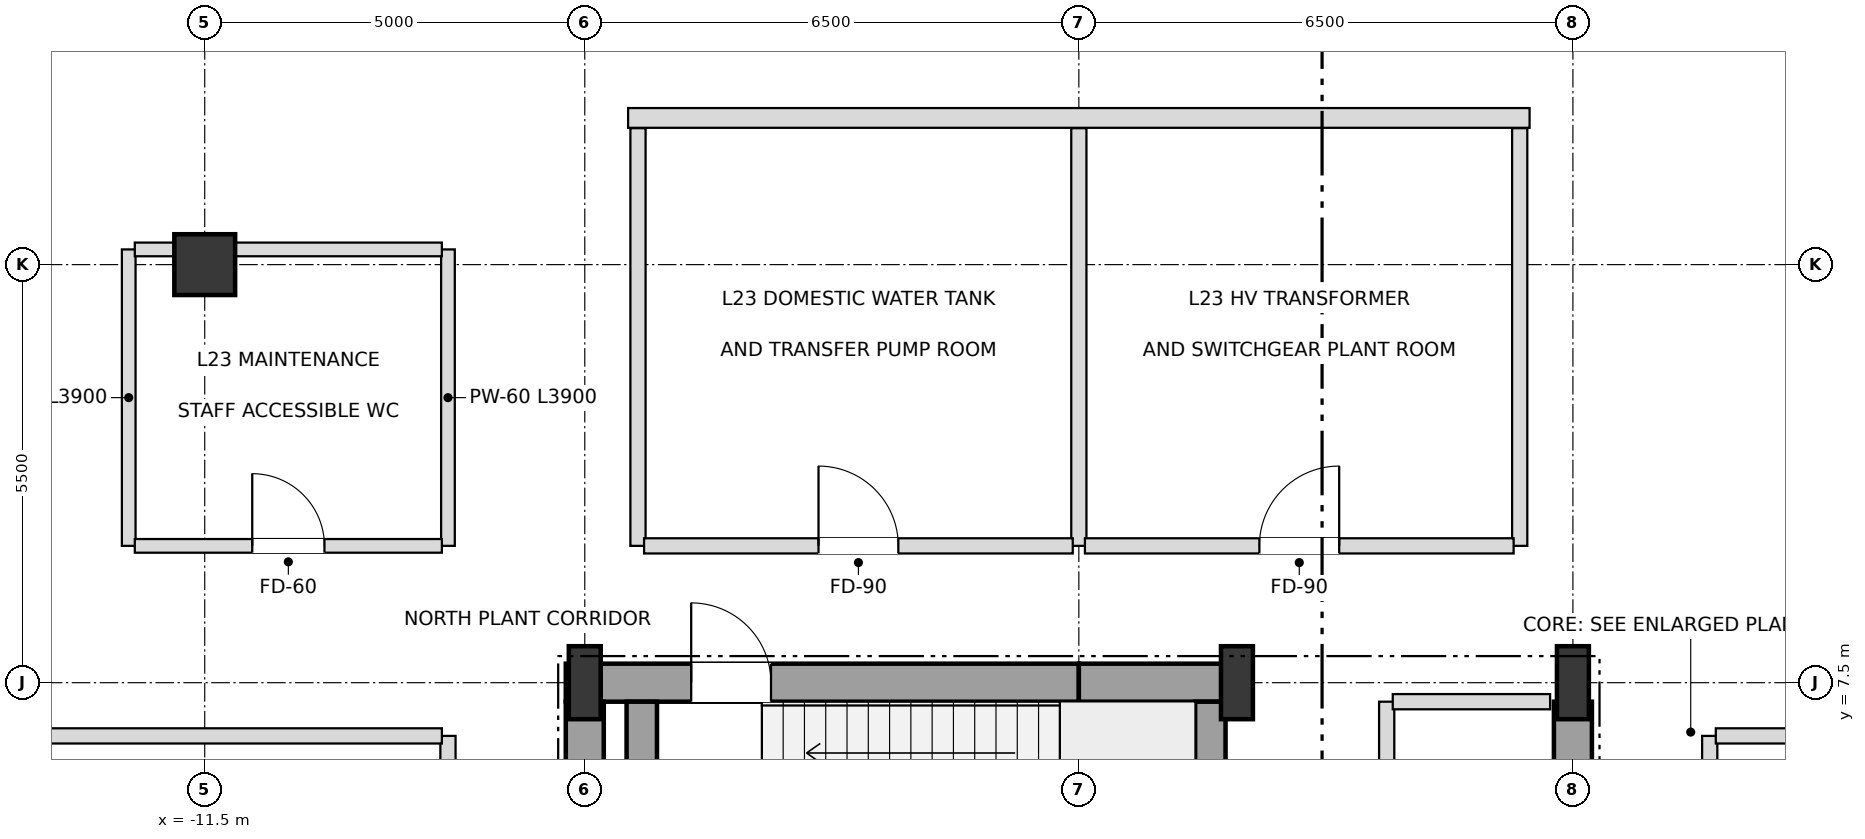
"""IFC4 building model, lengths in metres.
Left out: names, types, materials, properties, quantities, classifications, styles, units other than length and angle.
Written with IfcOpenShell. Run it as: python <this file> out.ifc"""

import sys

from ifc_helpers import new_model, si_unit, direction, frame, frame_2d, origin, origin_2d, place, context, subcontext, project, spatial, rectangle, i_section, extrude, element, fill, save


model = new_model("IFC4")
c1 = context("Model", 3, precision=1e-05, world=origin(), true_north=direction((0.0, 1.0)))
c2 = subcontext(c1, "Body", "Model", "MODEL_VIEW")
j1 = project(units=[si_unit("LENGTHUNIT", "METRE"), si_unit("PLANEANGLEUNIT", "RADIAN")], contexts=[c1])
p1 = place(None, origin())
s1 = spatial("IfcSite", under=j1, at=p1, CompositionType="ELEMENT")
p2 = place(p1, origin())
s2 = spatial("IfcBuilding", under=s1, at=p2, CompositionType="ELEMENT")
p3 = place(p2, frame((0.0, 0.0, 93.6)))
s3 = spatial("IfcBuildingStorey", under=s2, at=p3, CompositionType="ELEMENT", Elevation=93.6)
for number, where, z_axis, x_axis in (
    (1, (-6.5, 7.5, 0.0), (0.0, 0.0, 1.0), (1.0, 0.0, 0.0)),
    (2, (2.08, 7.5, 0.0), (0.0, 0.0, 1.0), (1.0, 0.0, 0.0)),
    (3, (6.5, 7.5, 0.0), (0.0, 0.0, 1.0), (1.0, 0.0, 0.0)),
):
    element("IfcColumn", number, at=place(p3, frame(where, z_axis=z_axis, x_axis=x_axis)), inside=s3, PredefinedType="COLUMN", context=c2, shape_type="SweptSolid", body=[
        extrude(i_section(OverallWidth=0.42, OverallDepth=0.96, WebThickness=0.022, FlangeThickness=0.034, at=origin_2d()), origin(), (0.0, 0.0, 1.0), 5.4),
    ])
p4 = place(p3, frame((-11.5, 13.0, 0.0), z_axis=(0.0, 0.0, 1.0), x_axis=(1.0, 0.0, 0.0)))
e4 = element("IfcColumn", 4, at=p4, inside=s3, PredefinedType="COLUMN", context=c2, shape_type="SweptSolid", body=[
    extrude(rectangle(XDim=0.8, YDim=0.8, at=origin_2d()), origin(), (0.0, 0.0, 1.0), 5.4),
])
p5 = place(p3, frame((-5.93, 14.93, 0.0), z_axis=(0.0, 0.0, 1.0), x_axis=(1.0, 0.0, 0.0)))
e5 = element("IfcWall", 5, at=p5, inside=s3, PredefinedType="SOLIDWALL", context=c2, shape_type="SweptSolid", body=[
    extrude(rectangle(XDim=11.86, YDim=0.26, at=frame_2d((5.93, 0.0))), origin(), (0.0, 0.0, 1.0), 5.1),
])
p6 = place(p3, frame((-6.75, 7.5, 0.0), z_axis=(0.0, 0.0, 1.0), x_axis=(1.0, 0.0, 0.0)))
e6 = element("IfcWall", 6, at=p6, inside=s3, PredefinedType="SHEAR", context=c2, shape_type="SweptSolid", body=[
    extrude(rectangle(XDim=6.75, YDim=0.5, at=frame_2d((3.375, 0.0))), origin(), (0.0, 0.0, 1.0), 5.1),
])
p7 = place(p6, frame((1.65, 0.0, 0.0)))
e7 = element("IfcOpeningElement", 7, at=p7, cuts=e6, PredefinedType="OPENING", context=c2, shape_type="SweptSolid", body=[
    extrude(rectangle(XDim=1.05, YDim=2.15, at=frame_2d((0.525, 1.075))), frame((0.0, 0.26, 0.0), z_axis=(0.0, -1.0, 0.0), x_axis=(1.0, 0.0, 0.0)), (0.0, 0.0, 1.0), 0.52),
])
p8 = place(p3, frame((0.0, 7.5, 0.0), z_axis=(0.0, 0.0, 1.0), x_axis=(1.0, 0.0, 0.0)))
e8 = element("IfcWall", 8, at=p8, inside=s3, PredefinedType="SHEAR", context=c2, shape_type="SweptSolid", body=[
    extrude(rectangle(XDim=2.08, YDim=0.5, at=frame_2d((1.04, 0.0))), origin(), (0.0, 0.0, 1.0), 5.1),
])
for number, where, z_axis, x_axis in (
    (9, (-6.5, 3.95, 0.0), (0.0, 0.0, 1.0), (0.0, 1.0, 0.0)),
    (10, (6.5, 3.95, 0.0), (0.0, 0.0, 1.0), (0.0, 1.0, 0.0)),
):
    element("IfcWall", number, at=place(p3, frame(where, z_axis=z_axis, x_axis=x_axis)), inside=s3, PredefinedType="SHEAR", context=c2, shape_type="SweptSolid", body=[
        extrude(rectangle(XDim=3.3, YDim=0.5, at=frame_2d((1.65, 0.0))), origin(), (0.0, 0.0, 1.0), 5.1),
    ])
for number, where, z_axis, x_axis in (
    (11, (1.73, 3.95, 0.0), (0.0, 0.0, 1.0), (0.0, 1.0, 0.0)),
    (12, (-5.75, 3.95, 0.0), (0.0, 0.0, 1.0), (0.0, 1.0, 0.0)),
):
    element("IfcWall", number, at=place(p3, frame(where, z_axis=z_axis, x_axis=x_axis)), inside=s3, PredefinedType="SHEAR", context=c2, shape_type="SweptSolid", body=[
        extrude(rectangle(XDim=3.3, YDim=0.4, at=frame_2d((1.65, 0.0))), origin(), (0.0, 0.0, 1.0), 5.1),
    ])
p9 = place(p3, frame((-12.5, 9.3, 0.0), z_axis=(0.0, 0.0, 1.0), x_axis=(0.0, 1.0, 0.0)))
e13 = element("IfcWall", 13, at=p9, inside=s3, PredefinedType="PARTITIONING", context=c2, shape_type="SweptSolid", body=[
    extrude(rectangle(XDim=3.9, YDim=0.18, at=frame_2d((1.95, 0.0))), origin(), (0.0, 0.0, 1.0), 3.285),
])
p10 = place(p3, frame((-8.3, -6.8, 0.0), z_axis=(0.0, 0.0, 1.0), x_axis=(0.0, 1.0, 0.0)))
e14 = element("IfcWall", 14, at=p10, inside=s3, PredefinedType="SOLIDWALL", context=c2, shape_type="SweptSolid", body=[
    extrude(rectangle(XDim=13.6, YDim=0.2, at=frame_2d((6.8, 0.0))), origin(), (0.0, 0.0, 1.0), 5.1),
])
p11 = place(p10, frame((6.275, 0.0, 0.0)))
e15 = element("IfcOpeningElement", 15, at=p11, cuts=e14, PredefinedType="OPENING", context=c2, shape_type="SweptSolid", body=[
    extrude(rectangle(XDim=1.05, YDim=2.15, at=frame_2d((0.525, 1.075))), frame((0.0, 0.11, 0.0), z_axis=(0.0, -1.0, 0.0), x_axis=(1.0, 0.0, 0.0)), (0.0, 0.0, 1.0), 0.22),
])
p12 = place(p3, frame((-8.3, 9.3, 0.0), z_axis=(0.0, 0.0, 1.0), x_axis=(0.0, 1.0, 0.0)))
e16 = element("IfcWall", 16, at=p12, inside=s3, PredefinedType="PARTITIONING", context=c2, shape_type="SweptSolid", body=[
    extrude(rectangle(XDim=3.9, YDim=0.18, at=frame_2d((1.95, 0.0))), origin(), (0.0, 0.0, 1.0), 4.153),
])
for number, where, z_axis, x_axis in (
    (17, (-5.8, 9.3, 0.0), (0.0, 0.0, 1.0), (0.0, 1.0, 0.0)),
    (18, (0.0, 9.3, 0.0), (0.0, 0.0, 1.0), (0.0, 1.0, 0.0)),
):
    element("IfcWall", number, at=place(p3, frame(where, z_axis=z_axis, x_axis=x_axis)), inside=s3, PredefinedType="SOLIDWALL", context=c2, shape_type="SweptSolid", body=[
        extrude(rectangle(XDim=5.495, YDim=0.2, at=frame_2d((2.748, 0.0))), origin(), (0.0, 0.0, 1.0), 5.1),
    ])
p13 = place(p3, frame((4.05, 4.2, 0.0), z_axis=(0.0, 0.0, 1.0), x_axis=(0.0, 1.0, 0.0)))
e19 = element("IfcWall", 19, at=p13, inside=s3, PredefinedType="SOLIDWALL", context=c2, shape_type="SweptSolid", body=[
    extrude(rectangle(XDim=3.05, YDim=0.2, at=frame_2d((1.525, 0.0))), origin(), (0.0, 0.0, 1.0), 5.1),
])
p14 = place(p13, frame((0.975, 0.0, 0.0)))
e20 = element("IfcOpeningElement", 20, at=p14, cuts=e19, PredefinedType="OPENING", context=c2, shape_type="SweptSolid", body=[
    extrude(rectangle(XDim=0.95, YDim=2.15, at=frame_2d((0.475, 1.075))), frame((0.0, 0.11, 0.0), z_axis=(0.0, -1.0, 0.0), x_axis=(1.0, 0.0, 0.0)), (0.0, 0.0, 1.0), 0.22),
])
p15 = place(p3, frame((5.8, 9.3, 0.0), z_axis=(0.0, 0.0, 1.0), x_axis=(0.0, 1.0, 0.0)))
e21 = element("IfcWall", 21, at=p15, inside=s3, PredefinedType="SOLIDWALL", context=c2, shape_type="SweptSolid", body=[
    extrude(rectangle(XDim=5.495, YDim=0.2, at=frame_2d((2.748, 0.0))), origin(), (0.0, 0.0, 1.0), 5.1),
])
p16 = place(p3, frame((8.3, -6.8, 0.0), z_axis=(0.0, 0.0, 1.0), x_axis=(0.0, 1.0, 0.0)))
e22 = element("IfcWall", 22, at=p16, inside=s3, PredefinedType="SOLIDWALL", context=c2, shape_type="SweptSolid", body=[
    extrude(rectangle(XDim=13.6, YDim=0.2, at=frame_2d((6.8, 0.0))), origin(), (0.0, 0.0, 1.0), 5.1),
])
p17 = place(p16, frame((6.275, 0.0, 0.0)))
e23 = element("IfcOpeningElement", 23, at=p17, cuts=e22, PredefinedType="OPENING", context=c2, shape_type="SweptSolid", body=[
    extrude(rectangle(XDim=1.05, YDim=2.15, at=frame_2d((0.525, 1.075))), frame((0.0, 0.11, 0.0), z_axis=(0.0, -1.0, 0.0), x_axis=(1.0, 0.0, 0.0)), (0.0, 0.0, 1.0), 0.22),
])
for number, where, z_axis, x_axis in (
    (24, (-16.195, 6.8, 0.0), (0.0, 0.0, 1.0), (1.0, 0.0, 0.0)),
    (25, (8.38, 6.8, 0.0), (0.0, 0.0, 1.0), (1.0, 0.0, 0.0)),
):
    element("IfcWall", number, at=place(p3, frame(where, z_axis=z_axis, x_axis=x_axis)), inside=s3, PredefinedType="SOLIDWALL", context=c2, shape_type="SweptSolid", body=[
        extrude(rectangle(XDim=7.815, YDim=0.2, at=frame_2d((3.908, 0.0))), origin(), (0.0, 0.0, 1.0), 5.1),
    ])
p18 = place(p3, frame((4.13, 7.25, 0.0), z_axis=(0.0, 0.0, 1.0), x_axis=(1.0, 0.0, 0.0)))
e26 = element("IfcWall", 26, at=p18, inside=s3, PredefinedType="SOLIDWALL", context=c2, shape_type="SweptSolid", body=[
    extrude(rectangle(XDim=2.07, YDim=0.2, at=frame_2d((1.035, 0.0))), origin(), (0.0, 0.0, 1.0), 4.153),
])
p19 = place(p3, frame((-12.42, 9.3, 0.0), z_axis=(0.0, 0.0, 1.0), x_axis=(1.0, 0.0, 0.0)))
e27 = element("IfcWall", 27, at=p19, inside=s3, PredefinedType="PARTITIONING", context=c2, shape_type="SweptSolid", body=[
    extrude(rectangle(XDim=4.04, YDim=0.18, at=frame_2d((2.02, 0.0))), origin(), (0.0, 0.0, 1.0), 5.1),
])
p20 = place(p19, frame((1.545, 0.0, 0.0)))
e28 = element("IfcOpeningElement", 28, at=p20, cuts=e27, PredefinedType="OPENING", context=c2, shape_type="SweptSolid", body=[
    extrude(rectangle(XDim=0.95, YDim=2.15, at=frame_2d((0.475, 1.075))), frame((0.0, 0.1, 0.0), z_axis=(0.0, -1.0, 0.0), x_axis=(1.0, 0.0, 0.0)), (0.0, 0.0, 1.0), 0.2),
])
p21 = place(p3, frame((-5.72, 9.3, 0.0), z_axis=(0.0, 0.0, 1.0), x_axis=(1.0, 0.0, 0.0)))
e29 = element("IfcWall", 29, at=p21, inside=s3, PredefinedType="SOLIDWALL", context=c2, shape_type="SweptSolid", body=[
    extrude(rectangle(XDim=5.64, YDim=0.2, at=frame_2d((2.82, 0.0))), origin(), (0.0, 0.0, 1.0), 5.1),
])
p22 = place(p21, frame((2.295, 0.0, 0.0)))
e30 = element("IfcOpeningElement", 30, at=p22, cuts=e29, PredefinedType="OPENING", context=c2, shape_type="SweptSolid", body=[
    extrude(rectangle(XDim=1.05, YDim=2.15, at=frame_2d((0.525, 1.075))), frame((0.0, 0.11, 0.0), z_axis=(0.0, -1.0, 0.0), x_axis=(1.0, 0.0, 0.0)), (0.0, 0.0, 1.0), 0.22),
])
p23 = place(p3, frame((0.08, 9.3, 0.0), z_axis=(0.0, 0.0, 1.0), x_axis=(1.0, 0.0, 0.0)))
e31 = element("IfcWall", 31, at=p23, inside=s3, PredefinedType="SOLIDWALL", context=c2, shape_type="SweptSolid", body=[
    extrude(rectangle(XDim=5.64, YDim=0.2, at=frame_2d((2.82, 0.0))), origin(), (0.0, 0.0, 1.0), 5.1),
])
p24 = place(p23, frame((2.295, 0.0, 0.0)))
e32 = element("IfcOpeningElement", 32, at=p24, cuts=e31, PredefinedType="OPENING", context=c2, shape_type="SweptSolid", body=[
    extrude(rectangle(XDim=1.05, YDim=2.15, at=frame_2d((0.525, 1.075))), frame((0.0, 0.11, 0.0), z_axis=(0.0, -1.0, 0.0), x_axis=(1.0, 0.0, 0.0)), (0.0, 0.0, 1.0), 0.22),
])
p25 = place(p3, frame((-12.42, 13.2, 0.0), z_axis=(0.0, 0.0, 1.0), x_axis=(1.0, 0.0, 0.0)))
e33 = element("IfcWall", 33, at=p25, inside=s3, PredefinedType="PARTITIONING", context=c2, shape_type="SweptSolid", body=[
    extrude(rectangle(XDim=4.04, YDim=0.18, at=frame_2d((2.02, 0.0))), origin(), (0.0, 0.0, 1.0), 3.285),
])
p26 = place(p7, origin())
e34 = element("IfcDoor", 34, at=p26, inside=s3, OperationType="SINGLE_SWING_LEFT", PredefinedType="DOOR", context=c2, shape_type="SweptSolid", body=[
    extrude(rectangle(XDim=1.05, YDim=2.15, at=frame_2d((0.525, 1.075))), frame((0.0, 0.025, 0.0), z_axis=(0.0, -1.0, 0.0), x_axis=(1.0, 0.0, 0.0)), (0.0, 0.0, 1.0), 0.05),
])
fill(e7, e34)
p27 = place(p22, origin())
e35 = element("IfcDoor", 35, at=p27, inside=s3, OperationType="SINGLE_SWING_LEFT", PredefinedType="DOOR", context=c2, shape_type="SweptSolid", body=[
    extrude(rectangle(XDim=1.05, YDim=2.15, at=frame_2d((0.525, 1.075))), frame((0.0, 0.025, 0.0), z_axis=(0.0, -1.0, 0.0), x_axis=(1.0, 0.0, 0.0)), (0.0, 0.0, 1.0), 0.05),
])
fill(e30, e35)
p28 = place(p24, origin())
e36 = element("IfcDoor", 36, at=p28, inside=s3, OperationType="SINGLE_SWING_RIGHT", PredefinedType="DOOR", context=c2, shape_type="SweptSolid", body=[
    extrude(rectangle(XDim=1.05, YDim=2.15, at=frame_2d((0.525, 1.075))), frame((0.0, 0.025, 0.0), z_axis=(0.0, -1.0, 0.0), x_axis=(1.0, 0.0, 0.0)), (0.0, 0.0, 1.0), 0.05),
])
fill(e32, e36)
p29 = place(p20, origin())
e37 = element("IfcDoor", 37, at=p29, inside=s3, OperationType="SINGLE_SWING_LEFT", PredefinedType="DOOR", context=c2, shape_type="SweptSolid", body=[
    extrude(rectangle(XDim=0.95, YDim=2.15, at=frame_2d((0.475, 1.075))), frame((0.0, 0.025, 0.0), z_axis=(0.0, -1.0, 0.0), x_axis=(1.0, 0.0, 0.0)), (0.0, 0.0, 1.0), 0.05),
])
fill(e28, e37)
save(model, sys.argv[1])
